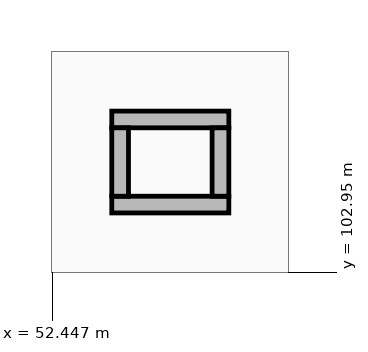
"""IFC4 building model, lengths in metres.
Left out: names, types, materials, properties, quantities, classifications, styles, units other than length and angle.
Written with IfcOpenShell. Run it as: python <this file> out.ifc"""

import sys

from ifc_helpers import new_model, si_unit, direction, frame, frame_2d, origin, place, context, subcontext, project, spatial, rectangle, extrude, element, save


model = new_model("IFC4")
c1 = context("Model", 3, precision=1e-05, world=origin(), true_north=direction((0.0, 1.0)))
c2 = subcontext(c1, "Body", "Model", "MODEL_VIEW")
j1 = project(units=[si_unit("LENGTHUNIT", "METRE"), si_unit("PLANEANGLEUNIT", "RADIAN")], contexts=[c1])
p1 = place(None, origin())
s1 = spatial("IfcSite", under=j1, at=p1, CompositionType="ELEMENT")
p2 = place(p1, origin())
s2 = spatial("IfcBuilding", under=s1, at=p2, CompositionType="ELEMENT")
p3 = place(p2, origin())
s3 = spatial("IfcBuildingStorey", under=s2, at=p3, CompositionType="ELEMENT", Elevation=0.0)
for number, where, z_axis, x_axis in (
    (1, (53.23, 103.84, 0.0), (0.0, 0.0, 1.0), (1.0, 0.0, 0.0)),
    (2, (53.23, 104.96, 0.0), (0.0, 0.0, 1.0), (1.0, 0.0, 0.0)),
):
    element("IfcWall", number, at=place(p3, frame(where, z_axis=z_axis, x_axis=x_axis)), inside=s3, PredefinedType="STANDARD", context=c2, shape_type="SweptSolid", body=[
        extrude(rectangle(XDim=1.54, YDim=0.22, at=frame_2d((0.77, 0.0))), origin(), (0.0, 0.0, 1.0), 2.6),
    ])
for number, where, z_axis, x_axis in (
    (3, (53.34, 103.95, 0.0), (0.0, 0.0, 1.0), (0.0, 1.0, 0.0)),
    (4, (54.66, 103.95, 0.0), (0.0, 0.0, 1.0), (0.0, 1.0, 0.0)),
):
    element("IfcWall", number, at=place(p3, frame(where, z_axis=z_axis, x_axis=x_axis)), inside=s3, PredefinedType="STANDARD", context=c2, shape_type="SweptSolid", body=[
        extrude(rectangle(XDim=0.9, YDim=0.22, at=frame_2d((0.45, 0.0))), origin(), (0.0, 0.0, 1.0), 2.6),
    ])
save(model, sys.argv[1])
